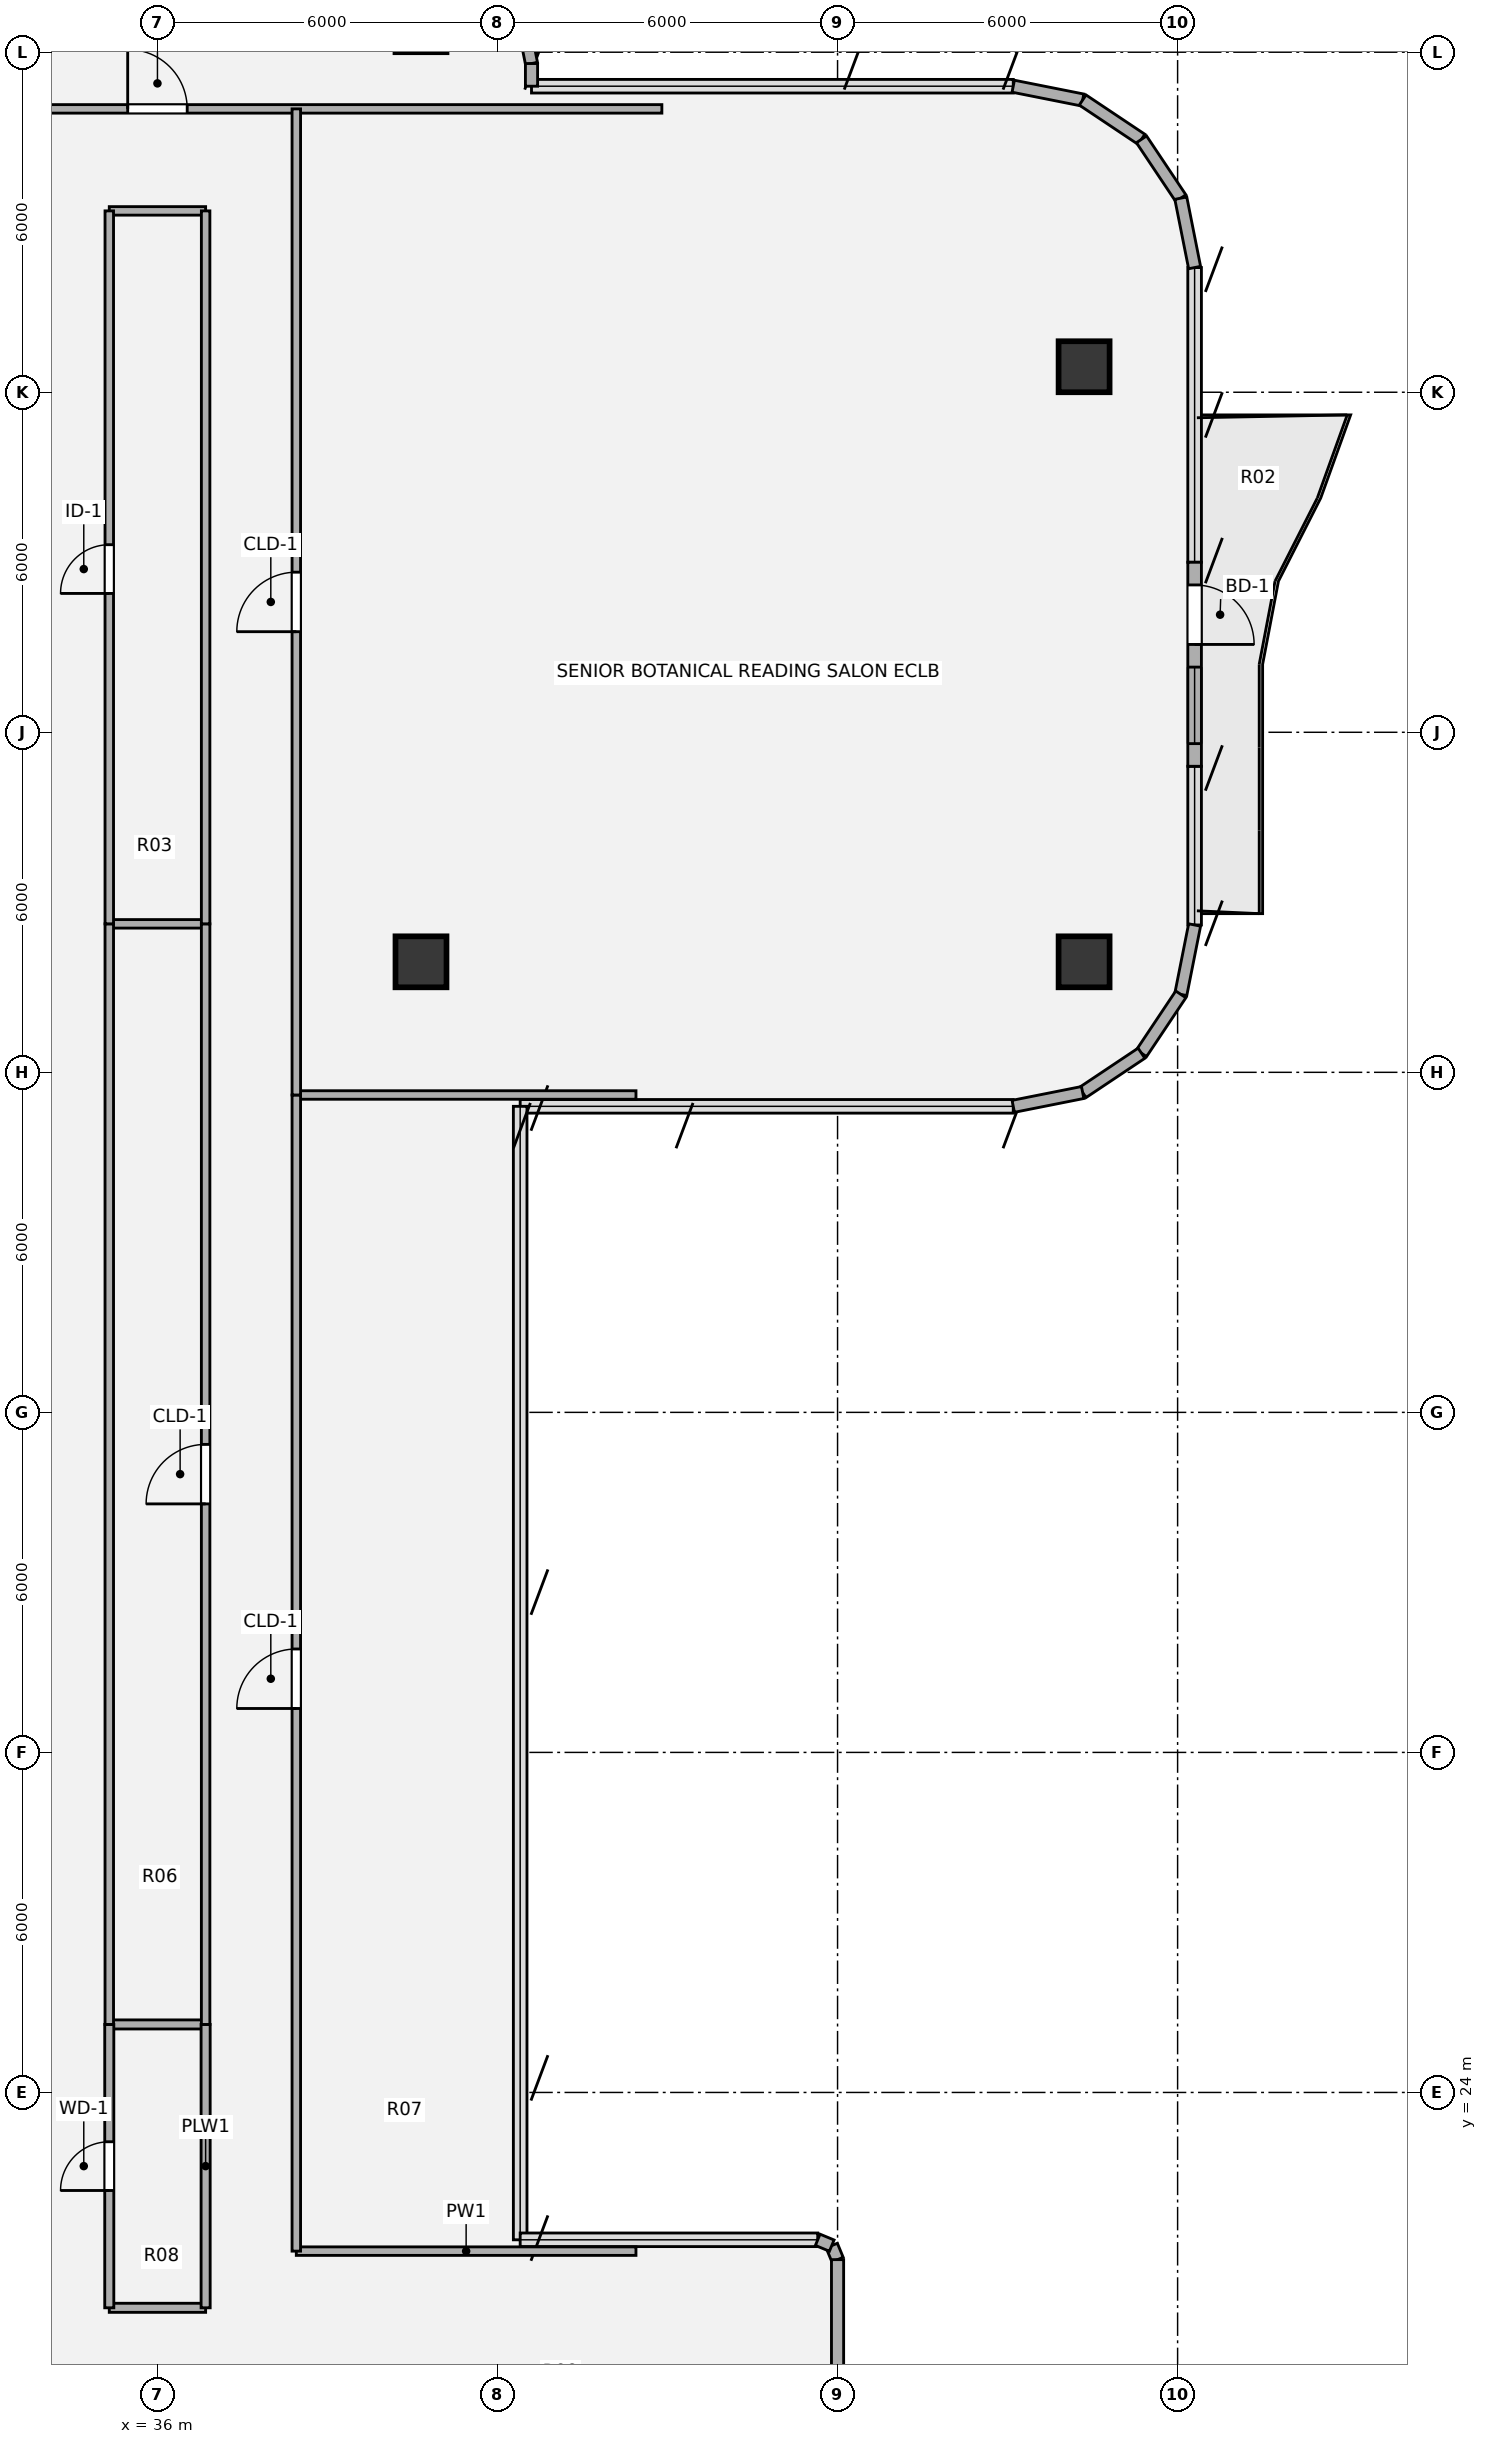
"""IFC4 building model, lengths in metres.
Left out: names, types, materials, properties, quantities, classifications, styles, units other than length and angle.
Written with IfcOpenShell. Run it as: python <this file> out.ifc"""

import sys

from ifc_helpers import new_model, si_unit, direction, frame, frame_2d, origin, origin_2d, place, context, subcontext, project, spatial, rectangle, hollow_circle, extrude, source, transform, mapped, element, fill, save


model = new_model("IFC4")
c1 = context("Model", 3, precision=1e-05, world=origin(), true_north=direction((0.0, 1.0)))
c2 = subcontext(c1, "Body", "Model", "MODEL_VIEW")
j1 = project(units=[si_unit("LENGTHUNIT", "METRE"), si_unit("PLANEANGLEUNIT", "RADIAN")], contexts=[c1])
p1 = place(None, origin())
s1 = spatial("IfcSite", under=j1, at=p1, CompositionType="ELEMENT")
p2 = place(p1, origin())
s2 = spatial("IfcBuilding", under=s1, at=p2, CompositionType="ELEMENT")
p3 = place(p2, frame((0.0, 0.0, 257.04)))
s3 = spatial("IfcBuildingStorey", under=s2, at=p3, CompositionType="ELEMENT", Elevation=257.04)
m1 = source(origin(), c2, "Body", "SweptSolid", [
    extrude(hollow_circle(Radius=0.45, WallThickness=0.032, at=origin_2d()), origin(), (0.0, 0.0, 1.0), 3.78),
])
for number, where, z_axis, x_axis in (
    (1, (52.35, 43.95, 0.0), (0.0, 0.0, 1.0), (1.0, 0.0, 0.0)),
    (2, (52.35, 54.45, 0.0), (0.0, 0.0, 1.0), (1.0, 0.0, 0.0)),
    (3, (40.65, 43.95, 0.0), (0.0, 0.0, 1.0), (1.0, 0.0, 0.0)),
):
    element("IfcColumn", number, at=place(p3, frame(where, z_axis=z_axis, x_axis=x_axis)), inside=s3, PredefinedType="COLUMN", context=c2, shape_type="MappedRepresentation", body=[
        mapped(m1, transform((0.0, 0.0, 0.0), x_axis=(1.0, 0.0, 0.0), y_axis=(0.0, 1.0, 0.0), z_axis=(0.0, 0.0, 1.0), scale=1.0)),
    ])
p4 = place(p3, frame((47.897, 21.298, 0.0), z_axis=(0.0, 0.0, 1.0), x_axis=(0.382673670509, -0.923883575944, 0.0)))
e4 = element("IfcWall", 4, at=p4, inside=s3, PredefinedType="SOLIDWALL", context=c2, shape_type="SweptSolid", body=[
    extrude(rectangle(XDim=0.268, YDim=0.215, at=frame_2d((0.134, 0.0))), origin(), (0.0, 0.0, 1.0), 3.53),
])
p5 = place(p3, frame((48.0, 21.05, 0.0), z_axis=(0.0, 0.0, 1.0), x_axis=(0.0, -1.0, 0.0)))
e5 = element("IfcWall", 5, at=p5, inside=s3, PredefinedType="SOLIDWALL", context=c2, shape_type="SweptSolid", body=[
    extrude(rectangle(XDim=2.77, YDim=0.215, at=frame_2d((1.385, 0.0))), origin(), (0.0, 0.0, 1.0), 2.718),
])
p6 = place(p3, frame((42.402, 60.795, 0.0), z_axis=(0.0, 0.0, 1.0), x_axis=(0.195190360752, -0.980765376158, 0.0)))
e6 = element("IfcWall", 6, at=p6, inside=s3, PredefinedType="SOLIDWALL", context=c2, shape_type="SweptSolid", body=[
    extrude(rectangle(XDim=1.014, YDim=0.215, at=frame_2d((0.507, 0.0))), origin(), (0.0, 0.0, 1.0), 3.53),
])
p7 = place(p3, frame((42.6, 59.8, 0.0), z_axis=(0.0, 0.0, 1.0), x_axis=(0.0, -1.0, 0.0)))
e7 = element("IfcWall", 7, at=p7, inside=s3, PredefinedType="SOLIDWALL", context=c2, shape_type="SweptSolid", body=[
    extrude(rectangle(XDim=0.4, YDim=0.215, at=frame_2d((0.2, 0.0))), origin(), (0.0, 0.0, 1.0), 3.53),
])
for number, where, z_axis, x_axis in (
    (8, (51.1, 59.4, 0.0), (0.0, 0.0, 1.0), (0.981, -0.195, 0.0)),
    (9, (52.325, 59.156, 0.0), (0.0, 0.0, 1.0), (0.831, -0.556, 0.0)),
    (10, (53.363, 58.463, 0.0), (0.0, 0.0, 1.0), (0.556, -0.831, 0.0)),
    (11, (54.056, 57.425, 0.0), (0.0, 0.0, 1.0), (0.195, -0.981, 0.0)),
):
    element("IfcWall", number, at=place(p3, frame(where, z_axis=z_axis, x_axis=x_axis)), inside=s3, PredefinedType="SOLIDWALL", context=c2, shape_type="SweptSolid", body=[
        extrude(rectangle(XDim=1.249, YDim=0.215, at=frame_2d((0.624, 0.0))), origin(), (0.0, 0.0, 1.0), 3.53),
    ])
p8 = place(p3, frame((54.3, 51.0, 0.0), z_axis=(0.0, 0.0, 1.0), x_axis=(0.0, -1.0, 0.0)))
e12 = element("IfcWall", 12, at=p8, inside=s3, PredefinedType="SOLIDWALL", context=c2, shape_type="SweptSolid", body=[
    extrude(rectangle(XDim=3.6, YDim=0.24, at=frame_2d((1.8, 0.0))), origin(), (0.0, 0.0, 1.0), 3.53),
])
p9 = place(p8, frame((0.4, 0.0, 0.0)))
e13 = element("IfcOpeningElement", 13, at=p9, cuts=e12, PredefinedType="OPENING", context=c2, shape_type="SweptSolid", body=[
    extrude(rectangle(XDim=1.05, YDim=2.15, at=origin_2d()), frame((0.525, 0.13, 1.075), z_axis=(0.0, -1.0, 0.0), x_axis=(1.0, 0.0, 0.0)), (0.0, 0.0, 1.0), 0.26),
])
p10 = place(p8, frame((1.85, 0.0, 0.85)))
e14 = element("IfcOpeningElement", 14, at=p10, cuts=e12, PredefinedType="OPENING", context=c2, shape_type="SweptSolid", body=[
    extrude(rectangle(XDim=1.35, YDim=1.35, at=origin_2d()), frame((0.675, 0.13, 0.675), z_axis=(0.0, -1.0, 0.0), x_axis=(1.0, 0.0, 0.0)), (0.0, 0.0, 1.0), 0.26),
])
for number, where, z_axis, x_axis in (
    (15, (54.3, 44.6, 0.0), (0.0, 0.0, 1.0), (-0.195, -0.981, 0.0)),
    (16, (54.056, 43.375, 0.0), (0.0, 0.0, 1.0), (-0.556, -0.831, 0.0)),
    (17, (53.363, 42.337, 0.0), (0.0, 0.0, 1.0), (-0.831, -0.556, 0.0)),
    (18, (52.325, 41.644, 0.0), (0.0, 0.0, 1.0), (-0.981, -0.195, 0.0)),
):
    element("IfcWall", number, at=place(p3, frame(where, z_axis=z_axis, x_axis=x_axis)), inside=s3, PredefinedType="SOLIDWALL", context=c2, shape_type="SweptSolid", body=[
        extrude(rectangle(XDim=1.249, YDim=0.215, at=frame_2d((0.624, 0.0))), origin(), (0.0, 0.0, 1.0), 3.53),
    ])
p11 = place(p3, frame((47.65, 21.4, 0.0), z_axis=(0.0, 0.0, 1.0), x_axis=(0.924205486139, -0.381895560841, 0.0)))
e19 = element("IfcWall", 19, at=p11, inside=s3, PredefinedType="SOLIDWALL", context=c2, shape_type="SweptSolid", body=[
    extrude(rectangle(XDim=0.268, YDim=0.215, at=frame_2d((0.134, 0.0))), origin(), (0.0, 0.0, 1.0), 3.53),
])
p12 = place(p3, frame((35.15, 20.2, 0.0), z_axis=(0.0, 0.0, 1.0), x_axis=(1.0, 0.0, 0.0)))
e20 = element("IfcWall", 20, at=p12, inside=s3, PredefinedType="PLUMBINGWALL", context=c2, shape_type="SweptSolid", body=[
    extrude(rectangle(XDim=1.7, YDim=0.16, at=frame_2d((0.85, 0.0))), origin(), (0.0, 0.0, 1.0), 3.5),
])
p13 = place(p3, frame((38.45, 21.2, 0.0), z_axis=(0.0, 0.0, 1.0), x_axis=(1.0, 0.0, 0.0)))
e21 = element("IfcWall", 21, at=p13, inside=s3, PredefinedType="PARTITIONING", context=c2, shape_type="SweptSolid", body=[
    extrude(rectangle(XDim=5.993, YDim=0.15, at=frame_2d((2.997, 0.0))), origin(), (0.0, 0.0, 1.0), 3.5),
])
p14 = place(p3, frame((35.15, 25.2, 0.0), z_axis=(0.0, 0.0, 1.0), x_axis=(1.0, 0.0, 0.0)))
e22 = element("IfcWall", 22, at=p14, inside=s3, PredefinedType="PLUMBINGWALL", context=c2, shape_type="SweptSolid", body=[
    extrude(rectangle(XDim=1.7, YDim=0.16, at=frame_2d((0.85, 0.0))), origin(), (0.0, 0.0, 1.0), 3.5),
])
p15 = place(p3, frame((38.45, 41.6, 0.0), z_axis=(0.0, 0.0, 1.0), x_axis=(1.0, 0.0, 0.0)))
e23 = element("IfcWall", 23, at=p15, inside=s3, PredefinedType="PARTITIONING", context=c2, shape_type="SweptSolid", body=[
    extrude(rectangle(XDim=5.993, YDim=0.15, at=frame_2d((2.997, 0.0))), origin(), (0.0, 0.0, 1.0), 3.5),
])
p16 = place(p3, frame((35.15, 44.62, 0.0), z_axis=(0.0, 0.0, 1.0), x_axis=(1.0, 0.0, 0.0)))
e24 = element("IfcWall", 24, at=p16, inside=s3, PredefinedType="PARTITIONING", context=c2, shape_type="SweptSolid", body=[
    extrude(rectangle(XDim=1.7, YDim=0.15, at=frame_2d((0.85, 0.0))), origin(), (0.0, 0.0, 1.0), 3.259),
])
p17 = place(p3, frame((35.15, 57.2, 0.0), z_axis=(0.0, 0.0, 1.0), x_axis=(1.0, 0.0, 0.0)))
e25 = element("IfcWall", 25, at=p17, inside=s3, PredefinedType="PARTITIONING", context=c2, shape_type="SweptSolid", body=[
    extrude(rectangle(XDim=1.7, YDim=0.15, at=frame_2d((0.85, 0.0))), origin(), (0.0, 0.0, 1.0), 3.308),
])
p18 = place(p3, frame((27.1, 59.0, 0.0), z_axis=(0.0, 0.0, 1.0), x_axis=(1.0, 0.0, 0.0)))
e26 = element("IfcWall", 26, at=p18, inside=s3, PredefinedType="PARTITIONING", context=c2, shape_type="SweptSolid", body=[
    extrude(rectangle(XDim=17.8, YDim=0.15, at=frame_2d((8.9, 0.0))), origin(), (0.0, 0.0, 1.0), 3.308),
])
p19 = place(p18, frame((8.375, 0.0, 0.0)))
e27 = element("IfcOpeningElement", 27, at=p19, cuts=e26, PredefinedType="OPENING", context=c2, shape_type="SweptSolid", body=[
    extrude(rectangle(XDim=1.05, YDim=2.1, at=origin_2d()), frame((0.525, 0.085, 1.05), z_axis=(0.0, -1.0, 0.0), x_axis=(1.0, 0.0, 0.0)), (0.0, 0.0, 1.0), 0.17),
])
p20 = place(p3, frame((35.15, 20.2, 0.0), z_axis=(0.0, 0.0, 1.0), x_axis=(0.0, 1.0, 0.0)))
e28 = element("IfcWall", 28, at=p20, inside=s3, PredefinedType="PLUMBINGWALL", context=c2, shape_type="SweptSolid", body=[
    extrude(rectangle(XDim=5.0, YDim=0.16, at=frame_2d((2.5, 0.0))), origin(), (0.0, 0.0, 1.0), 3.5),
])
p21 = place(p20, frame((2.07, 0.0, 0.0)))
e29 = element("IfcOpeningElement", 29, at=p21, cuts=e28, PredefinedType="OPENING", context=c2, shape_type="SweptSolid", body=[
    extrude(rectangle(XDim=0.86, YDim=2.1, at=origin_2d()), frame((0.43, 0.09, 1.05), z_axis=(0.0, -1.0, 0.0), x_axis=(1.0, 0.0, 0.0)), (0.0, 0.0, 1.0), 0.18),
])
p22 = place(p3, frame((35.15, 25.2, 0.0), z_axis=(0.0, 0.0, 1.0), x_axis=(0.0, 1.0, 0.0)))
e30 = element("IfcWall", 30, at=p22, inside=s3, PredefinedType="PARTITIONING", context=c2, shape_type="SweptSolid", body=[
    extrude(rectangle(XDim=19.42, YDim=0.15, at=frame_2d((9.71, 0.0))), origin(), (0.0, 0.0, 1.0), 3.5),
])
p23 = place(p3, frame((35.15, 44.62, 0.0), z_axis=(0.0, 0.0, 1.0), x_axis=(0.0, 1.0, 0.0)))
e31 = element("IfcWall", 31, at=p23, inside=s3, PredefinedType="PARTITIONING", context=c2, shape_type="SweptSolid", body=[
    extrude(rectangle(XDim=12.58, YDim=0.15, at=frame_2d((6.29, 0.0))), origin(), (0.0, 0.0, 1.0), 3.5),
])
p24 = place(p23, frame((5.83, 0.0, 0.0)))
e32 = element("IfcOpeningElement", 32, at=p24, cuts=e31, PredefinedType="OPENING", context=c2, shape_type="SweptSolid", body=[
    extrude(rectangle(XDim=0.86, YDim=2.1, at=origin_2d()), frame((0.43, 0.085, 1.05), z_axis=(0.0, -1.0, 0.0), x_axis=(1.0, 0.0, 0.0)), (0.0, 0.0, 1.0), 0.17),
])
p25 = place(p3, frame((36.85, 20.2, 0.0), z_axis=(0.0, 0.0, 1.0), x_axis=(0.0, 1.0, 0.0)))
e33 = element("IfcWall", 33, at=p25, inside=s3, PredefinedType="PLUMBINGWALL", context=c2, shape_type="SweptSolid", body=[
    extrude(rectangle(XDim=5.0, YDim=0.16, at=frame_2d((2.5, 0.0))), origin(), (0.0, 0.0, 1.0), 3.5),
])
p26 = place(p3, frame((36.85, 25.2, 0.0), z_axis=(0.0, 0.0, 1.0), x_axis=(0.0, 1.0, 0.0)))
e34 = element("IfcWall", 34, at=p26, inside=s3, PredefinedType="PARTITIONING", context=c2, shape_type="SweptSolid", body=[
    extrude(rectangle(XDim=19.42, YDim=0.15, at=frame_2d((9.71, 0.0))), origin(), (0.0, 0.0, 1.0), 3.5),
])
p27 = place(p26, frame((9.185, 0.0, 0.0)))
e35 = element("IfcOpeningElement", 35, at=p27, cuts=e34, PredefinedType="OPENING", context=c2, shape_type="SweptSolid", body=[
    extrude(rectangle(XDim=1.05, YDim=2.1, at=origin_2d()), frame((0.525, 0.085, 1.05), z_axis=(0.0, -1.0, 0.0), x_axis=(1.0, 0.0, 0.0)), (0.0, 0.0, 1.0), 0.17),
])
p28 = place(p3, frame((36.85, 44.62, 0.0), z_axis=(0.0, 0.0, 1.0), x_axis=(0.0, 1.0, 0.0)))
e36 = element("IfcWall", 36, at=p28, inside=s3, PredefinedType="PARTITIONING", context=c2, shape_type="SweptSolid", body=[
    extrude(rectangle(XDim=12.58, YDim=0.15, at=frame_2d((6.29, 0.0))), origin(), (0.0, 0.0, 1.0), 3.5),
])
p29 = place(p3, frame((38.45, 21.2, 0.0), z_axis=(0.0, 0.0, 1.0), x_axis=(0.0, 1.0, 0.0)))
e37 = element("IfcWall", 37, at=p29, inside=s3, PredefinedType="PARTITIONING", context=c2, shape_type="SweptSolid", body=[
    extrude(rectangle(XDim=20.4, YDim=0.15, at=frame_2d((10.2, 0.0))), origin(), (0.0, 0.0, 1.0), 3.5),
])
p30 = place(p29, frame((9.575, 0.0, 0.0)))
e38 = element("IfcOpeningElement", 38, at=p30, cuts=e37, PredefinedType="OPENING", context=c2, shape_type="SweptSolid", body=[
    extrude(rectangle(XDim=1.05, YDim=2.1, at=origin_2d()), frame((0.525, 0.085, 1.05), z_axis=(0.0, -1.0, 0.0), x_axis=(1.0, 0.0, 0.0)), (0.0, 0.0, 1.0), 0.17),
])
p31 = place(p3, frame((38.45, 41.6, 0.0), z_axis=(0.0, 0.0, 1.0), x_axis=(0.0, 1.0, 0.0)))
e39 = element("IfcWall", 39, at=p31, inside=s3, PredefinedType="PARTITIONING", context=c2, shape_type="SweptSolid", body=[
    extrude(rectangle(XDim=17.4, YDim=0.15, at=frame_2d((8.7, 0.0))), origin(), (0.0, 0.0, 1.0), 3.5),
])
p32 = place(p31, frame((8.175, 0.0, 0.0)))
e40 = element("IfcOpeningElement", 40, at=p32, cuts=e39, PredefinedType="OPENING", context=c2, shape_type="SweptSolid", body=[
    extrude(rectangle(XDim=1.05, YDim=2.1, at=origin_2d()), frame((0.525, 0.085, 1.05), z_axis=(0.0, -1.0, 0.0), x_axis=(1.0, 0.0, 0.0)), (0.0, 0.0, 1.0), 0.17),
])
m2 = source(origin(), c2, "Body", "SweptSolid", [
    extrude(rectangle(XDim=1.05, YDim=2.15, at=origin_2d()), frame((0.525, 0.025, 1.075), z_axis=(0.0, -1.0, 0.0), x_axis=(1.0, 0.0, 0.0)), (0.0, 0.0, 1.0), 0.05),
])
p33 = place(p9, origin())
e41 = element("IfcDoor", 41, at=p33, inside=s3, OperationType="SINGLE_SWING_RIGHT", PredefinedType="DOOR", context=c2, shape_type="MappedRepresentation", body=[
    mapped(m2, transform((0.0, 0.0, 0.0), x_axis=(1.0, 0.0, 0.0), y_axis=(0.0, 1.0, 0.0), z_axis=(0.0, 0.0, 1.0), scale=1.0)),
])
fill(e13, e41)
m3 = source(origin(), c2, "Body", "SweptSolid", [
    extrude(rectangle(XDim=1.35, YDim=1.35, at=origin_2d()), frame((0.675, 0.03, 0.675), z_axis=(0.0, -1.0, 0.0), x_axis=(1.0, 0.0, 0.0)), (0.0, 0.0, 1.0), 0.06),
])
p34 = place(p10, origin())
e42 = element("IfcWindow", 42, at=p34, inside=s3, PartitioningType="SINGLE_PANEL", PredefinedType="WINDOW", context=c2, shape_type="MappedRepresentation", body=[
    mapped(m3, transform((0.0, 0.0, 0.0), x_axis=(1.0, 0.0, 0.0), y_axis=(0.0, 1.0, 0.0), z_axis=(0.0, 0.0, 1.0), scale=1.0)),
])
fill(e14, e42)
m4 = source(origin(), c2, "Body", "SweptSolid", [
    extrude(rectangle(XDim=1.05, YDim=2.1, at=origin_2d()), frame((0.525, 0.025, 1.05), z_axis=(0.0, -1.0, 0.0), x_axis=(1.0, 0.0, 0.0)), (0.0, 0.0, 1.0), 0.05),
])
p35 = place(p19, origin())
e43 = element("IfcDoor", 43, at=p35, inside=s3, OperationType="SINGLE_SWING_LEFT", PredefinedType="DOOR", context=c2, shape_type="MappedRepresentation", body=[
    mapped(m4, transform((0.0, 0.0, 0.0), x_axis=(1.0, 0.0, 0.0), y_axis=(0.0, 1.0, 0.0), z_axis=(0.0, 0.0, 1.0), scale=1.0)),
])
fill(e27, e43)
m5 = source(origin(), c2, "Body", "SweptSolid", [
    extrude(rectangle(XDim=0.86, YDim=2.1, at=origin_2d()), frame((0.43, 0.025, 1.05), z_axis=(0.0, -1.0, 0.0), x_axis=(1.0, 0.0, 0.0)), (0.0, 0.0, 1.0), 0.05),
])
p36 = place(p21, origin())
e44 = element("IfcDoor", 44, at=p36, inside=s3, OperationType="SINGLE_SWING_LEFT", PredefinedType="DOOR", context=c2, shape_type="MappedRepresentation", body=[
    mapped(m5, transform((0.0, 0.0, 0.0), x_axis=(1.0, 0.0, 0.0), y_axis=(0.0, 1.0, 0.0), z_axis=(0.0, 0.0, 1.0), scale=1.0)),
])
fill(e29, e44)
m6 = source(origin(), c2, "Body", "SweptSolid", [
    extrude(rectangle(XDim=0.86, YDim=2.1, at=origin_2d()), frame((0.43, 0.025, 1.05), z_axis=(0.0, -1.0, 0.0), x_axis=(1.0, 0.0, 0.0)), (0.0, 0.0, 1.0), 0.05),
])
p37 = place(p24, origin())
e45 = element("IfcDoor", 45, at=p37, inside=s3, OperationType="SINGLE_SWING_LEFT", PredefinedType="DOOR", context=c2, shape_type="MappedRepresentation", body=[
    mapped(m6, transform((0.0, 0.0, 0.0), x_axis=(1.0, 0.0, 0.0), y_axis=(0.0, 1.0, 0.0), z_axis=(0.0, 0.0, 1.0), scale=1.0)),
])
fill(e32, e45)
p38 = place(p27, origin())
e46 = element("IfcDoor", 46, at=p38, inside=s3, OperationType="SINGLE_SWING_LEFT", PredefinedType="DOOR", context=c2, shape_type="MappedRepresentation", body=[
    mapped(m4, transform((0.0, 0.0, 0.0), x_axis=(1.0, 0.0, 0.0), y_axis=(0.0, 1.0, 0.0), z_axis=(0.0, 0.0, 1.0), scale=1.0)),
])
fill(e35, e46)
p39 = place(p30, origin())
e47 = element("IfcDoor", 47, at=p39, inside=s3, OperationType="SINGLE_SWING_LEFT", PredefinedType="DOOR", context=c2, shape_type="MappedRepresentation", body=[
    mapped(m4, transform((0.0, 0.0, 0.0), x_axis=(1.0, 0.0, 0.0), y_axis=(0.0, 1.0, 0.0), z_axis=(0.0, 0.0, 1.0), scale=1.0)),
])
fill(e38, e47)
p40 = place(p32, origin())
e48 = element("IfcDoor", 48, at=p40, inside=s3, OperationType="SINGLE_SWING_LEFT", PredefinedType="DOOR", context=c2, shape_type="MappedRepresentation", body=[
    mapped(m4, transform((0.0, 0.0, 0.0), x_axis=(1.0, 0.0, 0.0), y_axis=(0.0, 1.0, 0.0), z_axis=(0.0, 0.0, 1.0), scale=1.0)),
])
fill(e40, e48)
save(model, sys.argv[1])
